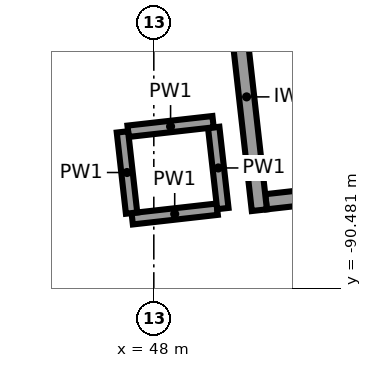
"""IFC4 building model, lengths in metres.
Left out: names, types, materials, properties, quantities, classifications, styles, units other than length and angle.
Written with IfcOpenShell. Run it as: python <this file> out.ifc"""

import sys

from ifc_helpers import new_model, si_unit, direction, frame, frame_2d, origin, place, context, subcontext, project, spatial, rectangle, extrude, element, save


model = new_model("IFC4")
c1 = context("Model", 3, precision=1e-05, world=origin(), true_north=direction((0.0, 1.0)))
c2 = subcontext(c1, "Body", "Model", "MODEL_VIEW")
j1 = project(units=[si_unit("LENGTHUNIT", "METRE"), si_unit("PLANEANGLEUNIT", "RADIAN")], contexts=[c1])
p1 = place(None, origin())
s1 = spatial("IfcSite", under=j1, at=p1, CompositionType="ELEMENT")
p2 = place(p1, origin())
s2 = spatial("IfcBuilding", under=s1, at=p2, CompositionType="ELEMENT")
p3 = place(p2, origin())
s3 = spatial("IfcBuildingStorey", under=s2, at=p3, CompositionType="ELEMENT", Elevation=0.0)
p4 = place(p3, frame((49.389, -89.454, 0.0), z_axis=(0.0, 0.0, 1.0), x_axis=(-0.111976588553, 0.993710845073, 0.0)))
e1 = element("IfcWall", 1, at=p4, inside=s3, PredefinedType="SHEAR", context=c2, shape_type="SweptSolid", body=[
    extrude(rectangle(XDim=3.0, YDim=0.2, at=frame_2d((1.5, 0.0))), origin(), (0.0, 0.0, 1.0), 6.15),
])
p5 = place(p3, frame((49.477, -89.343, 0.0), z_axis=(0.0, 0.0, 1.0), x_axis=(0.993718105662, 0.11191213732, 0.0)))
e2 = element("IfcWall", 2, at=p5, inside=s3, PredefinedType="SHEAR", context=c2, shape_type="SweptSolid", body=[
    extrude(rectangle(XDim=1.9, YDim=0.2, at=frame_2d((0.95, 0.0))), origin(), (0.0, 0.0, 1.0), 6.15),
])
p6 = place(p3, frame((47.716, -89.567, 0.0), z_axis=(0.0, 0.0, 1.0), x_axis=(0.993710504932, 0.11197960702, 0.0)))
e3 = element("IfcWall", 3, at=p6, inside=s3, PredefinedType="PARTITIONING", context=c2, shape_type="SweptSolid", body=[
    extrude(rectangle(XDim=1.125, YDim=0.15, at=frame_2d((0.562, 0.0))), origin(), (0.0, 0.0, 1.0), 6.15),
])
p7 = place(p3, frame((48.908, -89.432, 0.0), z_axis=(0.0, 0.0, 1.0), x_axis=(-0.111951742856, 0.993713644503, 0.0)))
e4 = element("IfcWall", 4, at=p7, inside=s3, PredefinedType="PARTITIONING", context=c2, shape_type="SweptSolid", body=[
    extrude(rectangle(XDim=1.075, YDim=0.15, at=frame_2d((0.538, 0.0))), origin(), (0.0, 0.0, 1.0), 6.15),
])
p8 = place(p3, frame((48.78, -88.29, 0.0), z_axis=(0.0, 0.0, 1.0), x_axis=(-0.993710504932, -0.11197960702, 0.0)))
e5 = element("IfcWall", 5, at=p8, inside=s3, PredefinedType="PARTITIONING", context=c2, shape_type="SweptSolid", body=[
    extrude(rectangle(XDim=1.125, YDim=0.15, at=frame_2d((0.562, 0.0))), origin(), (0.0, 0.0, 1.0), 6.15),
])
p9 = place(p3, frame((47.587, -88.424, 0.0), z_axis=(0.0, 0.0, 1.0), x_axis=(0.111951742856, -0.993713644503, 0.0)))
e6 = element("IfcWall", 6, at=p9, inside=s3, PredefinedType="PARTITIONING", context=c2, shape_type="SweptSolid", body=[
    extrude(rectangle(XDim=1.075, YDim=0.15, at=frame_2d((0.538, 0.0))), origin(), (0.0, 0.0, 1.0), 6.15),
])
save(model, sys.argv[1])
